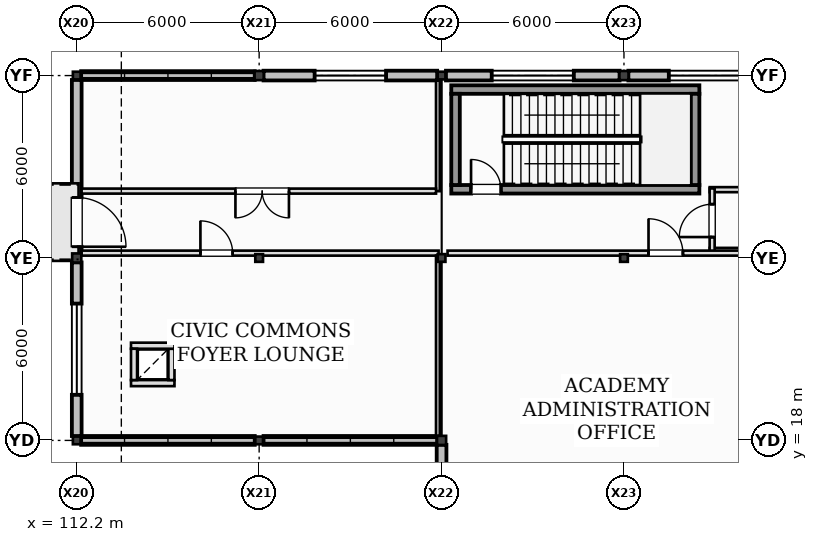
"""IFC4 building model, lengths in metres.
Left out: names, types, materials, properties, quantities, classifications, styles, units other than length and angle.
Written with IfcOpenShell. Run it as: python <this file> out.ifc"""

import sys

from ifc_helpers import new_model, si_unit, direction, frame, frame_2d, origin, origin_2d, place, context, subcontext, project, spatial, rectangle, hollow_rectangle, i_section, extrude, element, fill, save


model = new_model("IFC4")
c1 = context("Model", 3, precision=1e-05, world=origin(), true_north=direction((0.0, 1.0)))
c2 = subcontext(c1, "Body", "Model", "MODEL_VIEW")
j1 = project(units=[si_unit("LENGTHUNIT", "METRE"), si_unit("PLANEANGLEUNIT", "RADIAN")], contexts=[c1])
p1 = place(None, origin())
s1 = spatial("IfcSite", under=j1, at=p1, CompositionType="ELEMENT")
p2 = place(p1, origin())
s2 = spatial("IfcBuilding", under=s1, at=p2, CompositionType="ELEMENT")
p3 = place(p2, origin())
s3 = spatial("IfcBuildingStorey", under=s2, at=p3, CompositionType="ELEMENT", Elevation=0.0)
p4 = place(p3, frame((112.2, 18.0, -0.41), z_axis=(0.0, 0.0, 1.0), x_axis=(1.0, 0.0, 0.0)))
e1 = element("IfcColumn", 1, at=p4, inside=s3, PredefinedType="COLUMN", context=c2, shape_type="SweptSolid", body=[
    extrude(i_section(OverallWidth=0.254, OverallDepth=0.253, WebThickness=0.009, FlangeThickness=0.014, at=origin_2d()), origin(), (0.0, 0.0, 1.0), 6.41),
])
p5 = place(p3, frame((112.2, 24.0, -0.41), z_axis=(0.0, 0.0, 1.0), x_axis=(1.0, 0.0, 0.0)))
e2 = element("IfcColumn", 2, at=p5, inside=s3, PredefinedType="COLUMN", context=c2, shape_type="SweptSolid", body=[
    extrude(hollow_rectangle(XDim=0.3, YDim=0.3, WallThickness=0.012, at=origin_2d()), origin(), (0.0, 0.0, 1.0), 6.41),
])
for number, where, z_axis, x_axis in (
    (3, (112.2, 30.0, -0.41), (0.0, 0.0, 1.0), (1.0, 0.0, 0.0)),
    (4, (118.2, 18.0, -0.41), (0.0, 0.0, 1.0), (1.0, 0.0, 0.0)),
    (5, (118.2, 24.0, -0.41), (0.0, 0.0, 1.0), (1.0, 0.0, 0.0)),
):
    element("IfcColumn", number, at=place(p3, frame(where, z_axis=z_axis, x_axis=x_axis)), inside=s3, PredefinedType="COLUMN", context=c2, shape_type="SweptSolid", body=[
        extrude(i_section(OverallWidth=0.254, OverallDepth=0.253, WebThickness=0.009, FlangeThickness=0.014, at=origin_2d()), origin(), (0.0, 0.0, 1.0), 6.41),
    ])
for number, where, z_axis, x_axis in (
    (6, (118.2, 30.0, -0.41), (0.0, 0.0, 1.0), (1.0, 0.0, 0.0)),
    (7, (124.2, 18.0, -0.41), (0.0, 0.0, 1.0), (1.0, 0.0, 0.0)),
):
    element("IfcColumn", number, at=place(p3, frame(where, z_axis=z_axis, x_axis=x_axis)), inside=s3, PredefinedType="COLUMN", context=c2, shape_type="SweptSolid", body=[
        extrude(hollow_rectangle(XDim=0.3, YDim=0.3, WallThickness=0.012, at=origin_2d()), origin(), (0.0, 0.0, 1.0), 6.41),
    ])
for number, where, z_axis, x_axis in (
    (8, (124.2, 24.0, -0.41), (0.0, 0.0, 1.0), (1.0, 0.0, 0.0)),
    (9, (124.2, 30.0, -0.41), (0.0, 0.0, 1.0), (1.0, 0.0, 0.0)),
    (10, (130.2, 18.0, -0.41), (0.0, 0.0, 1.0), (1.0, 0.0, 0.0)),
    (11, (130.2, 24.0, -0.41), (0.0, 0.0, 1.0), (1.0, 0.0, 0.0)),
):
    element("IfcColumn", number, at=place(p3, frame(where, z_axis=z_axis, x_axis=x_axis)), inside=s3, PredefinedType="COLUMN", context=c2, shape_type="SweptSolid", body=[
        extrude(i_section(OverallWidth=0.254, OverallDepth=0.253, WebThickness=0.009, FlangeThickness=0.014, at=origin_2d()), origin(), (0.0, 0.0, 1.0), 6.41),
    ])
p6 = place(p3, frame((130.2, 30.0, -0.41), z_axis=(0.0, 0.0, 1.0), x_axis=(1.0, 0.0, 0.0)))
e12 = element("IfcColumn", 12, at=p6, inside=s3, PredefinedType="COLUMN", context=c2, shape_type="SweptSolid", body=[
    extrude(hollow_rectangle(XDim=0.3, YDim=0.3, WallThickness=0.012, at=origin_2d()), origin(), (0.0, 0.0, 1.0), 6.41),
])
p7 = place(p3, frame((112.345, 18.0, 0.0), z_axis=(0.0, 0.0, 1.0), x_axis=(1.0, 0.0, 0.0)))
e13 = element("IfcWall", 13, at=p7, inside=s3, PredefinedType="STANDARD", context=c2, shape_type="SweptSolid", body=[
    extrude(rectangle(XDim=5.71, YDim=0.29, at=frame_2d((2.855, 0.0))), origin(), (0.0, 0.0, 1.0), 0.8),
])
p8 = place(p3, frame((118.345, 18.0, 0.0), z_axis=(0.0, 0.0, 1.0), x_axis=(1.0, 0.0, 0.0)))
e14 = element("IfcWall", 14, at=p8, inside=s3, PredefinedType="STANDARD", context=c2, shape_type="SweptSolid", body=[
    extrude(rectangle(XDim=5.71, YDim=0.29, at=frame_2d((2.855, 0.0))), origin(), (0.0, 0.0, 1.0), 0.92),
])
p9 = place(p3, frame((118.055, 30.0, 0.0), z_axis=(0.0, 0.0, 1.0), x_axis=(-1.0, 0.0, 0.0)))
e15 = element("IfcWall", 15, at=p9, inside=s3, PredefinedType="STANDARD", context=c2, shape_type="SweptSolid", body=[
    extrude(rectangle(XDim=5.71, YDim=0.29, at=frame_2d((2.855, 0.0))), origin(), (0.0, 0.0, 1.0), 0.32),
])
p10 = place(p3, frame((124.055, 30.0, 0.0), z_axis=(0.0, 0.0, 1.0), x_axis=(-1.0, 0.0, 0.0)))
e16 = element("IfcWall", 16, at=p10, inside=s3, PredefinedType="STANDARD", context=c2, shape_type="SweptSolid", body=[
    extrude(rectangle(XDim=5.71, YDim=0.32, at=frame_2d((2.855, 0.0))), origin(), (0.0, 0.0, 1.0), 5.035),
])
p11 = place(p10, frame((1.68, 0.0, 0.85)))
e17 = element("IfcOpeningElement", 17, at=p11, cuts=e16, PredefinedType="OPENING", context=c2, shape_type="SweptSolid", body=[
    extrude(rectangle(XDim=2.35, YDim=1.75, at=frame_2d((1.175, 0.875))), frame((0.0, 0.17, 0.0), z_axis=(0.0, -1.0, 0.0), x_axis=(1.0, 0.0, 0.0)), (0.0, 0.0, 1.0), 0.34),
])
p12 = place(p3, frame((130.055, 30.0, 0.0), z_axis=(0.0, 0.0, 1.0), x_axis=(-1.0, 0.0, 0.0)))
e18 = element("IfcWall", 18, at=p12, inside=s3, PredefinedType="STANDARD", context=c2, shape_type="SweptSolid", body=[
    extrude(rectangle(XDim=5.71, YDim=0.32, at=frame_2d((2.855, 0.0))), origin(), (0.0, 0.0, 1.0), 5.035),
])
p13 = place(p12, frame((1.505, 0.0, 0.85)))
e19 = element("IfcOpeningElement", 19, at=p13, cuts=e18, PredefinedType="OPENING", context=c2, shape_type="SweptSolid", body=[
    extrude(rectangle(XDim=2.7, YDim=1.75, at=frame_2d((1.35, 0.875))), frame((0.0, 0.17, 0.0), z_axis=(0.0, -1.0, 0.0), x_axis=(1.0, 0.0, 0.0)), (0.0, 0.0, 1.0), 0.34),
])
p14 = place(p3, frame((136.055, 30.0, 0.0), z_axis=(0.0, 0.0, 1.0), x_axis=(-1.0, 0.0, 0.0)))
e20 = element("IfcWall", 20, at=p14, inside=s3, PredefinedType="STANDARD", context=c2, shape_type="SweptSolid", body=[
    extrude(rectangle(XDim=5.71, YDim=0.32, at=frame_2d((2.855, 0.0))), origin(), (0.0, 0.0, 1.0), 5.035),
])
p15 = place(p14, frame((1.33, 0.0, 0.85)))
e21 = element("IfcOpeningElement", 21, at=p15, cuts=e20, PredefinedType="OPENING", context=c2, shape_type="SweptSolid", body=[
    extrude(rectangle(XDim=3.05, YDim=1.75, at=frame_2d((1.525, 0.875))), frame((0.0, 0.17, 0.0), z_axis=(0.0, -1.0, 0.0), x_axis=(1.0, 0.0, 0.0)), (0.0, 0.0, 1.0), 0.34),
])
p16 = place(p3, frame((112.2, 23.855, 0.0), z_axis=(0.0, 0.0, 1.0), x_axis=(0.0, -1.0, 0.0)))
e22 = element("IfcWall", 22, at=p16, inside=s3, PredefinedType="STANDARD", context=c2, shape_type="SweptSolid", body=[
    extrude(rectangle(XDim=5.71, YDim=0.32, at=frame_2d((2.855, 0.0))), origin(), (0.0, 0.0, 1.0), 5.044),
])
p17 = place(p16, frame((1.355, 0.0, 1.0)))
e23 = element("IfcOpeningElement", 23, at=p17, cuts=e22, PredefinedType="OPENING", context=c2, shape_type="SweptSolid", body=[
    extrude(rectangle(XDim=3.0, YDim=0.88, at=frame_2d((1.5, 0.44))), frame((0.0, 0.17, 0.0), z_axis=(0.0, -1.0, 0.0), x_axis=(1.0, 0.0, 0.0)), (0.0, 0.0, 1.0), 0.34),
])
p18 = place(p3, frame((112.2, 29.855, 0.0), z_axis=(0.0, 0.0, 1.0), x_axis=(0.0, -1.0, 0.0)))
e24 = element("IfcWall", 24, at=p18, inside=s3, PredefinedType="STANDARD", context=c2, shape_type="SweptSolid", body=[
    extrude(rectangle(XDim=5.71, YDim=0.32, at=frame_2d((2.855, 0.0))), origin(), (0.0, 0.0, 1.0), 5.044),
])
p19 = place(p18, frame((3.865, 0.0, 0.0)))
e25 = element("IfcOpeningElement", 25, at=p19, cuts=e24, PredefinedType="OPENING", context=c2, shape_type="SweptSolid", body=[
    extrude(rectangle(XDim=1.62, YDim=2.2, at=frame_2d((0.81, 1.1))), frame((0.0, 0.17, 0.0), z_axis=(0.0, -1.0, 0.0), x_axis=(1.0, 0.0, 0.0)), (0.0, 0.0, 1.0), 0.34),
])
p20 = place(p3, frame((124.2, 17.855, 0.0), z_axis=(0.0, 0.0, 1.0), x_axis=(0.0, -1.0, 0.0)))
e26 = element("IfcWall", 26, at=p20, inside=s3, PredefinedType="STANDARD", context=c2, shape_type="SweptSolid", body=[
    extrude(rectangle(XDim=3.91, YDim=0.32, at=frame_2d((1.955, 0.0))), origin(), (0.0, 0.0, 1.0), 5.044),
])
p21 = place(p3, frame((124.52, 26.26, 0.0), z_axis=(0.0, 0.0, 1.0), x_axis=(1.0, 0.0, 0.0)))
e27 = element("IfcWall", 27, at=p21, inside=s3, PredefinedType="SHEAR", context=c2, shape_type="SweptSolid", body=[
    extrude(rectangle(XDim=8.16, YDim=0.28, at=frame_2d((4.08, 0.0))), origin(), (0.0, 0.0, 1.0), 6.0),
])
p22 = place(p21, frame((0.65, 0.0, 0.0)))
e28 = element("IfcOpeningElement", 28, at=p22, cuts=e27, PredefinedType="OPENING", context=c2, shape_type="SweptSolid", body=[
    extrude(rectangle(XDim=0.98, YDim=2.15, at=frame_2d((0.49, 1.075))), frame((0.0, 0.15, 0.0), z_axis=(0.0, -1.0, 0.0), x_axis=(1.0, 0.0, 0.0)), (0.0, 0.0, 1.0), 0.3),
])
p23 = place(p3, frame((132.68, 29.54, 0.0), z_axis=(0.0, 0.0, 1.0), x_axis=(-1.0, 0.0, 0.0)))
e29 = element("IfcWall", 29, at=p23, inside=s3, PredefinedType="SHEAR", context=c2, shape_type="SweptSolid", body=[
    extrude(rectangle(XDim=8.16, YDim=0.28, at=frame_2d((4.08, 0.0))), origin(), (0.0, 0.0, 1.0), 6.0),
])
for number, where, z_axis, x_axis in (
    (30, (124.66, 29.4, 0.0), (0.0, 0.0, 1.0), (0.0, -1.0, 0.0)),
    (31, (132.54, 26.4, 0.0), (0.0, 0.0, 1.0), (0.0, 1.0, 0.0)),
):
    element("IfcWall", number, at=place(p3, frame(where, z_axis=z_axis, x_axis=x_axis)), inside=s3, PredefinedType="SHEAR", context=c2, shape_type="SweptSolid", body=[
        extrude(rectangle(XDim=3.0, YDim=0.28, at=frame_2d((1.5, 0.0))), origin(), (0.0, 0.0, 1.0), 6.0),
    ])
p24 = place(p3, frame((133.02, 24.25, 0.0), z_axis=(0.0, 0.0, 1.0), x_axis=(1.0, 0.0, 0.0)))
e32 = element("IfcWall", 32, at=p24, inside=s3, PredefinedType="PARTITIONING", context=c2, shape_type="SweptSolid", body=[
    extrude(rectangle(XDim=5.16, YDim=0.165, at=frame_2d((2.58, 0.0))), origin(), (0.0, 0.0, 1.0), 5.035),
])
p25 = place(p3, frame((133.02, 26.248, 0.0), z_axis=(0.0, 0.0, 1.0), x_axis=(1.0, 0.0, 0.0)))
e33 = element("IfcWall", 33, at=p25, inside=s3, PredefinedType="PARTITIONING", context=c2, shape_type="SweptSolid", body=[
    extrude(rectangle(XDim=1.115, YDim=0.165, at=frame_2d((0.558, 0.0))), origin(), (0.0, 0.0, 1.0), 5.68),
])
p26 = place(p3, frame((133.1, 24.17, 0.0), z_axis=(0.0, 0.0, 1.0), x_axis=(0.0, 1.0, 0.0)))
e34 = element("IfcWall", 34, at=p26, inside=s3, PredefinedType="PARTITIONING", context=c2, shape_type="SweptSolid", body=[
    extrude(rectangle(XDim=2.118, YDim=0.165, at=frame_2d((1.059, 0.0))), origin(), (0.0, 0.0, 1.0), 5.68),
])
p27 = place(p26, frame((0.519, 0.0, 0.0)))
e35 = element("IfcOpeningElement", 35, at=p27, cuts=e34, PredefinedType="OPENING", context=c2, shape_type="SweptSolid", body=[
    extrude(rectangle(XDim=1.08, YDim=2.14, at=frame_2d((0.54, 1.07))), frame((0.0, 0.093, 0.0), z_axis=(0.0, -1.0, 0.0), x_axis=(1.0, 0.0, 0.0)), (0.0, 0.0, 1.0), 0.185),
])
p28 = place(p3, frame((113.985, 19.885, 0.0), z_axis=(0.0, 0.0, 1.0), x_axis=(1.0, 0.0, 0.0)))
e36 = element("IfcWall", 36, at=p28, inside=s3, PredefinedType="PARTITIONING", context=c2, shape_type="SweptSolid", body=[
    extrude(rectangle(XDim=1.43, YDim=0.2, at=frame_2d((0.715, 0.0))), origin(), (0.0, 0.0, 1.0), 5.68),
])
p29 = place(p3, frame((115.315, 19.985, 0.0), z_axis=(0.0, 0.0, 1.0), x_axis=(0.0, 1.0, 0.0)))
e37 = element("IfcWall", 37, at=p29, inside=s3, PredefinedType="PARTITIONING", context=c2, shape_type="SweptSolid", body=[
    extrude(rectangle(XDim=1.03, YDim=0.2, at=frame_2d((0.515, 0.0))), origin(), (0.0, 0.0, 1.0), 5.68),
])
p30 = place(p3, frame((115.415, 21.115, 0.0), z_axis=(0.0, 0.0, 1.0), x_axis=(-1.0, 0.0, 0.0)))
e38 = element("IfcWall", 38, at=p30, inside=s3, PredefinedType="PARTITIONING", context=c2, shape_type="SweptSolid", body=[
    extrude(rectangle(XDim=1.43, YDim=0.2, at=frame_2d((0.715, 0.0))), origin(), (0.0, 0.0, 1.0), 5.68),
])
p31 = place(p3, frame((114.085, 21.015, 0.0), z_axis=(0.0, 0.0, 1.0), x_axis=(0.0, -1.0, 0.0)))
e39 = element("IfcWall", 39, at=p31, inside=s3, PredefinedType="PARTITIONING", context=c2, shape_type="SweptSolid", body=[
    extrude(rectangle(XDim=1.03, YDim=0.2, at=frame_2d((0.515, 0.0))), origin(), (0.0, 0.0, 1.0), 5.339),
])
p32 = place(p3, frame((112.36, 24.16, 0.0), z_axis=(0.0, 0.0, 1.0), x_axis=(1.0, 0.0, 0.0)))
e40 = element("IfcWall", 40, at=p32, inside=s3, PredefinedType="PARTITIONING", context=c2, shape_type="SweptSolid", body=[
    extrude(rectangle(XDim=11.742, YDim=0.165, at=frame_2d((5.871, 0.0))), origin(), (0.0, 0.0, 1.0), 5.035),
])
p33 = place(p32, frame((3.908, 0.0, 0.0)))
e41 = element("IfcOpeningElement", 41, at=p33, cuts=e40, PredefinedType="OPENING", context=c2, shape_type="SweptSolid", body=[
    extrude(rectangle(XDim=1.06, YDim=2.25, at=frame_2d((0.53, 1.125))), frame((0.0, 0.093, 0.0), z_axis=(0.0, -1.0, 0.0), x_axis=(1.0, 0.0, 0.0)), (0.0, 0.0, 1.0), 0.185),
])
p34 = place(p3, frame((124.08, 24.08, 0.0), z_axis=(0.0, 0.0, 1.0), x_axis=(0.0, -1.0, 0.0)))
e42 = element("IfcWall", 42, at=p34, inside=s3, PredefinedType="PARTITIONING", context=c2, shape_type="SweptSolid", body=[
    extrude(rectangle(XDim=5.935, YDim=0.125, at=frame_2d((2.968, 0.0))), origin(), (0.0, 0.0, 1.0), 5.044),
])
p35 = place(p3, frame((124.08, 29.84, 0.0), z_axis=(0.0, 0.0, 1.0), x_axis=(0.0, -1.0, 0.0)))
e43 = element("IfcWall", 43, at=p35, inside=s3, PredefinedType="PARTITIONING", context=c2, shape_type="SweptSolid", body=[
    extrude(rectangle(XDim=3.643, YDim=0.125, at=frame_2d((1.821, 0.0))), origin(), (0.0, 0.0, 1.0), 5.044),
])
p36 = place(p3, frame((124.018, 26.2, 0.0), z_axis=(0.0, 0.0, 1.0), x_axis=(-1.0, 0.0, 0.0)))
e44 = element("IfcWall", 44, at=p36, inside=s3, PredefinedType="PARTITIONING", context=c2, shape_type="SweptSolid", body=[
    extrude(rectangle(XDim=11.657, YDim=0.165, at=frame_2d((5.829, 0.0))), origin(), (0.0, 0.0, 1.0), 5.68),
])
p37 = place(p36, frame((4.837, 0.0, 0.0)))
e45 = element("IfcOpeningElement", 45, at=p37, cuts=e44, PredefinedType="OPENING", context=c2, shape_type="SweptSolid", body=[
    extrude(rectangle(XDim=1.76, YDim=2.26, at=frame_2d((0.88, 1.13))), frame((0.0, 0.093, 0.0), z_axis=(0.0, -1.0, 0.0), x_axis=(1.0, 0.0, 0.0)), (0.0, 0.0, 1.0), 0.185),
])
p38 = place(p3, frame((124.397, 24.16, 0.0), z_axis=(0.0, 0.0, 1.0), x_axis=(1.0, 0.0, 0.0)))
e46 = element("IfcWall", 46, at=p38, inside=s3, PredefinedType="PARTITIONING", context=c2, shape_type="SweptSolid", body=[
    extrude(rectangle(XDim=13.683, YDim=0.165, at=frame_2d((6.841, 0.0))), origin(), (0.0, 0.0, 1.0), 5.035),
])
p39 = place(p38, frame((6.61, 0.0, 0.0)))
e47 = element("IfcOpeningElement", 47, at=p39, cuts=e46, PredefinedType="OPENING", context=c2, shape_type="SweptSolid", body=[
    extrude(rectangle(XDim=1.13, YDim=2.18, at=frame_2d((0.565, 1.09))), frame((0.0, 0.093, 0.0), z_axis=(0.0, -1.0, 0.0), x_axis=(1.0, 0.0, 0.0)), (0.0, 0.0, 1.0), 0.185),
])
p40 = place(p11, origin())
e48 = element("IfcWindow", 48, at=p40, inside=s3, PartitioningType="SINGLE_PANEL", PredefinedType="WINDOW", context=c2, shape_type="SweptSolid", body=[
    extrude(rectangle(XDim=2.35, YDim=1.75, at=frame_2d((1.175, 0.875))), frame((0.0, 0.03, 0.0), z_axis=(0.0, -1.0, 0.0), x_axis=(1.0, 0.0, 0.0)), (0.0, 0.0, 1.0), 0.06),
])
fill(e17, e48)
p41 = place(p13, origin())
e49 = element("IfcWindow", 49, at=p41, inside=s3, PartitioningType="SINGLE_PANEL", PredefinedType="WINDOW", context=c2, shape_type="SweptSolid", body=[
    extrude(rectangle(XDim=2.7, YDim=1.75, at=frame_2d((1.35, 0.875))), frame((0.0, 0.03, 0.0), z_axis=(0.0, -1.0, 0.0), x_axis=(1.0, 0.0, 0.0)), (0.0, 0.0, 1.0), 0.06),
])
fill(e19, e49)
p42 = place(p15, origin())
e50 = element("IfcWindow", 50, at=p42, inside=s3, PartitioningType="SINGLE_PANEL", PredefinedType="WINDOW", context=c2, shape_type="SweptSolid", body=[
    extrude(rectangle(XDim=3.05, YDim=1.75, at=frame_2d((1.525, 0.875))), frame((0.0, 0.03, 0.0), z_axis=(0.0, -1.0, 0.0), x_axis=(1.0, 0.0, 0.0)), (0.0, 0.0, 1.0), 0.06),
])
fill(e21, e50)
p43 = place(p17, origin())
e51 = element("IfcWindow", 51, at=p43, inside=s3, PartitioningType="SINGLE_PANEL", PredefinedType="WINDOW", context=c2, shape_type="SweptSolid", body=[
    extrude(rectangle(XDim=3.0, YDim=0.88, at=frame_2d((1.5, 0.44))), frame((0.0, 0.03, 0.0), z_axis=(0.0, -1.0, 0.0), x_axis=(1.0, 0.0, 0.0)), (0.0, 0.0, 1.0), 0.06),
])
fill(e23, e51)
p44 = place(p19, frame((1.62, 0.0, 0.0), z_axis=(0.0, 0.0, 1.0), x_axis=(-1.0, 0.0, 0.0)))
e52 = element("IfcDoor", 52, at=p44, inside=s3, OperationType="SINGLE_SWING_RIGHT", PredefinedType="DOOR", context=c2, shape_type="SweptSolid", body=[
    extrude(rectangle(XDim=1.62, YDim=2.2, at=frame_2d((0.81, 1.1))), frame((0.0, 0.025, 0.0), z_axis=(0.0, -1.0, 0.0), x_axis=(1.0, 0.0, 0.0)), (0.0, 0.0, 1.0), 0.05),
])
fill(e25, e52)
p45 = place(p22, origin())
e53 = element("IfcDoor", 53, at=p45, inside=s3, OperationType="SINGLE_SWING_LEFT", PredefinedType="DOOR", context=c2, shape_type="SweptSolid", body=[
    extrude(rectangle(XDim=0.98, YDim=2.15, at=frame_2d((0.49, 1.075))), frame((0.0, 0.025, 0.0), z_axis=(0.0, -1.0, 0.0), x_axis=(1.0, 0.0, 0.0)), (0.0, 0.0, 1.0), 0.05),
])
fill(e28, e53)
p46 = place(p27, frame((1.08, 0.0, 0.0), z_axis=(0.0, 0.0, 1.0), x_axis=(-1.0, 0.0, 0.0)))
e54 = element("IfcDoor", 54, at=p46, inside=s3, OperationType="SINGLE_SWING_LEFT", PredefinedType="DOOR", context=c2, shape_type="SweptSolid", body=[
    extrude(rectangle(XDim=1.08, YDim=2.14, at=frame_2d((0.54, 1.07))), frame((0.0, 0.025, 0.0), z_axis=(0.0, -1.0, 0.0), x_axis=(1.0, 0.0, 0.0)), (0.0, 0.0, 1.0), 0.05),
])
fill(e35, e54)
p47 = place(p33, origin())
e55 = element("IfcDoor", 55, at=p47, inside=s3, OperationType="SINGLE_SWING_LEFT", PredefinedType="DOOR", context=c2, shape_type="SweptSolid", body=[
    extrude(rectangle(XDim=1.06, YDim=2.25, at=frame_2d((0.53, 1.125))), frame((0.0, 0.025, 0.0), z_axis=(0.0, -1.0, 0.0), x_axis=(1.0, 0.0, 0.0)), (0.0, 0.0, 1.0), 0.05),
])
fill(e41, e55)
p48 = place(p37, frame((1.76, 0.0, 0.0), z_axis=(0.0, 0.0, 1.0), x_axis=(-1.0, 0.0, 0.0)))
e56 = element("IfcDoor", 56, at=p48, inside=s3, OperationType="DOUBLE_DOOR_SINGLE_SWING", PredefinedType="DOOR", context=c2, shape_type="SweptSolid", body=[
    extrude(rectangle(XDim=1.76, YDim=2.26, at=frame_2d((0.88, 1.13))), frame((0.0, 0.025, 0.0), z_axis=(0.0, -1.0, 0.0), x_axis=(1.0, 0.0, 0.0)), (0.0, 0.0, 1.0), 0.05),
])
fill(e45, e56)
p49 = place(p39, frame((1.13, 0.0, 0.0), z_axis=(0.0, 0.0, 1.0), x_axis=(-1.0, 0.0, 0.0)))
e57 = element("IfcDoor", 57, at=p49, inside=s3, OperationType="SINGLE_SWING_LEFT", PredefinedType="DOOR", context=c2, shape_type="SweptSolid", body=[
    extrude(rectangle(XDim=1.13, YDim=2.18, at=frame_2d((0.565, 1.09))), frame((0.0, 0.025, 0.0), z_axis=(0.0, -1.0, 0.0), x_axis=(1.0, 0.0, 0.0)), (0.0, 0.0, 1.0), 0.05),
])
fill(e47, e57)
save(model, sys.argv[1])
